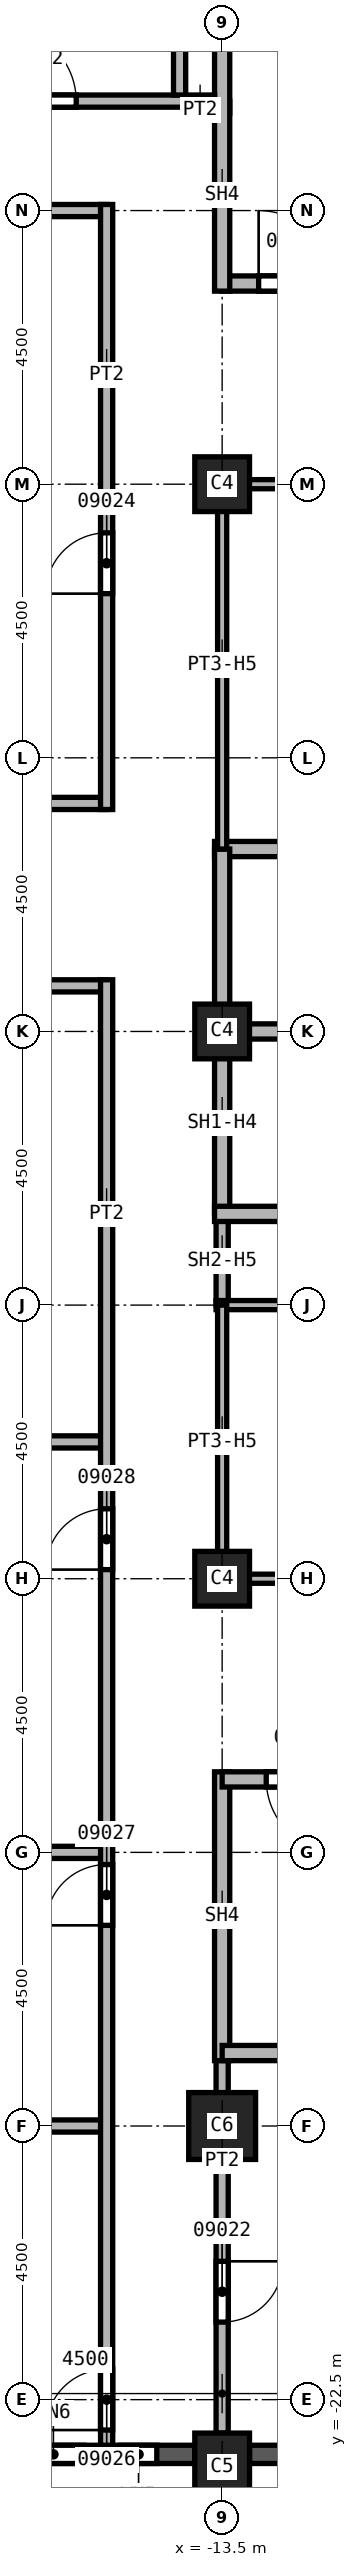
"""IFC4 building model, lengths in metres.
Left out: names, types, materials, properties, quantities, classifications, styles, units other than length and angle.
Written with IfcOpenShell. Run it as: python <this file> out.ifc"""

import sys

from ifc_helpers import new_model, si_unit, direction, frame, frame_2d, origin, origin_2d, place, context, subcontext, project, spatial, rectangle, extrude, element, fill, save


model = new_model("IFC4")
c1 = context("Model", 3, precision=1e-05, world=origin(), true_north=direction((0.0, 1.0)))
c2 = subcontext(c1, "Body", "Model", "MODEL_VIEW")
j1 = project(units=[si_unit("LENGTHUNIT", "METRE"), si_unit("PLANEANGLEUNIT", "RADIAN")], contexts=[c1])
p1 = place(None, origin())
s1 = spatial("IfcSite", under=j1, at=p1, CompositionType="ELEMENT")
p2 = place(p1, origin())
s2 = spatial("IfcBuilding", under=s1, at=p2, CompositionType="ELEMENT")
p3 = place(p2, frame((0.0, 0.0, 162.0)))
s3 = spatial("IfcBuildingStorey", under=s2, at=p3, CompositionType="ELEMENT", Elevation=162.0)
p4 = place(p3, frame((-13.5, -18.0, 0.0), z_axis=(0.0, 0.0, 1.0), x_axis=(1.0, 0.0, 0.0)))
e1 = element("IfcColumn", 1, at=p4, inside=s3, PredefinedType="COLUMN", context=c2, shape_type="SweptSolid", body=[
    extrude(rectangle(XDim=1.1, YDim=1.1, at=origin_2d()), origin(), (0.0, 0.0, 1.0), 3.7),
])
for number, where, z_axis, x_axis in (
    (2, (-13.5, 0.0, 0.0), (0.0, 0.0, 1.0), (1.0, 0.0, 0.0)),
    (3, (-13.5, 9.0, 0.0), (0.0, 0.0, 1.0), (1.0, 0.0, 0.0)),
    (4, (-13.5, -9.0, 0.0), (0.0, 0.0, 1.0), (1.0, 0.0, 0.0)),
):
    element("IfcColumn", number, at=place(p3, frame(where, z_axis=z_axis, x_axis=x_axis)), inside=s3, PredefinedType="COLUMN", context=c2, shape_type="SweptSolid", body=[
        extrude(rectangle(XDim=0.9, YDim=0.9, at=origin_2d()), origin(), (0.0, 0.0, 1.0), 3.7),
    ])
p5 = place(p3, frame((-13.5, -23.6, 0.0), z_axis=(0.0, 0.0, 1.0), x_axis=(1.0, 0.0, 0.0)))
e5 = element("IfcColumn", 5, at=p5, inside=s3, PredefinedType="COLUMN", context=c2, shape_type="SweptSolid", body=[
    extrude(rectangle(XDim=0.9, YDim=1.1, at=origin_2d()), origin(), (0.0, 0.0, 1.0), 3.7),
])
p6 = place(p3, frame((-17.55, -23.4, 0.0), z_axis=(0.0, 0.0, 1.0), x_axis=(1.0, 0.0, 0.0)))
e6 = element("IfcWall", 6, at=p6, inside=s3, PredefinedType="SOLIDWALL", context=c2, shape_type="SweptSolid", body=[
    extrude(rectangle(XDim=3.6, YDim=0.3, at=frame_2d((1.8, 0.0))), origin(), (0.0, 0.0, 1.0), 3.1),
])
p7 = place(p6, frame((0.775, 0.0, 0.8)))
e7 = element("IfcOpeningElement", 7, at=p7, cuts=e6, PredefinedType="OPENING", context=c2, shape_type="SweptSolid", body=[
    extrude(rectangle(XDim=1.0, YDim=1.95, at=frame_2d((0.5, 0.975))), frame((0.0, 0.15, 0.0), z_axis=(0.0, -1.0, 0.0), x_axis=(1.0, 0.0, 0.0)), (0.0, 0.0, 1.0), 0.3),
])
p8 = place(p6, frame((2.375, 0.0, 0.8)))
e8 = element("IfcOpeningElement", 8, at=p8, cuts=e6, PredefinedType="OPENING", context=c2, shape_type="SweptSolid", body=[
    extrude(rectangle(XDim=0.6, YDim=1.95, at=frame_2d((0.3, 0.975))), frame((0.0, 0.15, 0.0), z_axis=(0.0, -1.0, 0.0), x_axis=(1.0, 0.0, 0.0)), (0.0, 0.0, 1.0), 0.3),
])
p9 = place(p3, frame((-13.05, -23.4, 0.0), z_axis=(0.0, 0.0, 1.0), x_axis=(1.0, 0.0, 0.0)))
e9 = element("IfcWall", 9, at=p9, inside=s3, PredefinedType="SOLIDWALL", context=c2, shape_type="SweptSolid", body=[
    extrude(rectangle(XDim=3.6, YDim=0.3, at=frame_2d((1.8, 0.0))), origin(), (0.0, 0.0, 1.0), 3.1),
])
p10 = place(p9, frame((0.6, 0.0, 0.8)))
e10 = element("IfcOpeningElement", 10, at=p10, cuts=e9, PredefinedType="OPENING", context=c2, shape_type="SweptSolid", body=[
    extrude(rectangle(XDim=2.4, YDim=1.95, at=frame_2d((1.2, 0.975))), frame((0.0, 0.15, 0.0), z_axis=(0.0, -1.0, 0.0), x_axis=(1.0, 0.0, 0.0)), (0.0, 0.0, 1.0), 0.3),
])
p11 = place(p3, frame((-33.85, 3.75, 0.0), z_axis=(0.0, 0.0, 1.0), x_axis=(1.0, 0.0, 0.0)))
e11 = element("IfcWall", 11, at=p11, inside=s3, PredefinedType="PARTITIONING", context=c2, shape_type="SweptSolid", body=[
    extrude(rectangle(XDim=18.45, YDim=0.2, at=frame_2d((9.225, 0.0))), origin(), (0.0, 0.0, 1.0), 3.7),
])
p12 = place(p11, frame((2.5, 0.0, 0.0)))
e12 = element("IfcOpeningElement", 12, at=p12, cuts=e11, PredefinedType="OPENING", context=c2, shape_type="SweptSolid", body=[
    extrude(rectangle(XDim=1.0, YDim=2.1, at=frame_2d((0.5, 1.05))), frame((0.0, 0.1, 0.0), z_axis=(0.0, -1.0, 0.0), x_axis=(1.0, 0.0, 0.0)), (0.0, 0.0, 1.0), 0.2),
])
for number, where, z_axis, x_axis in (
    (13, (-27.1, -13.5, 0.0), (0.0, 0.0, 1.0), (1.0, 0.0, 0.0)),
    (14, (-27.1, -6.75, 0.0), (0.0, 0.0, 1.0), (1.0, 0.0, 0.0)),
):
    element("IfcWall", number, at=place(p3, frame(where, z_axis=z_axis, x_axis=x_axis)), inside=s3, PredefinedType="PARTITIONING", context=c2, shape_type="SweptSolid", body=[
        extrude(rectangle(XDim=11.7, YDim=0.2, at=frame_2d((5.85, 0.0))), origin(), (0.0, 0.0, 1.0), 3.7),
    ])
p13 = place(p3, frame((-15.4, 0.75, 0.0), z_axis=(0.0, 0.0, 1.0), x_axis=(-1.0, 0.0, 0.0)))
e15 = element("IfcWall", 15, at=p13, inside=s3, PredefinedType="PARTITIONING", context=c2, shape_type="SweptSolid", body=[
    extrude(rectangle(XDim=18.45, YDim=0.2, at=frame_2d((9.225, 0.0))), origin(), (0.0, 0.0, 1.0), 3.7),
])
p14 = place(p13, frame((5.35, 0.0, 0.0)))
e16 = element("IfcOpeningElement", 16, at=p14, cuts=e15, PredefinedType="OPENING", context=c2, shape_type="SweptSolid", body=[
    extrude(rectangle(XDim=1.0, YDim=2.1, at=frame_2d((0.5, 1.05))), frame((0.0, 0.1, 0.0), z_axis=(0.0, -1.0, 0.0), x_axis=(1.0, 0.0, 0.0)), (0.0, 0.0, 1.0), 0.2),
])
p15 = place(p3, frame((-24.2, -18.0, 0.0), z_axis=(0.0, 0.0, 1.0), x_axis=(1.0, 0.0, 0.0)))
e17 = element("IfcWall", 17, at=p15, inside=s3, PredefinedType="PARTITIONING", context=c2, shape_type="SweptSolid", body=[
    extrude(rectangle(XDim=8.8, YDim=0.2, at=frame_2d((4.4, 0.0))), origin(), (0.0, 0.0, 1.0), 3.7),
])
p16 = place(p3, frame((-15.4, 13.5, 0.0), z_axis=(0.0, 0.0, 1.0), x_axis=(-1.0, 0.0, 0.0)))
e18 = element("IfcWall", 18, at=p16, inside=s3, PredefinedType="PARTITIONING", context=c2, shape_type="SweptSolid", body=[
    extrude(rectangle(XDim=6.6, YDim=0.2, at=frame_2d((3.3, 0.0))), origin(), (0.0, 0.0, 1.0), 3.7),
])
p17 = place(p3, frame((-15.4, -23.25, 0.0), z_axis=(0.0, 0.0, 1.0), x_axis=(0.0, 1.0, 0.0)))
e19 = element("IfcWall", 19, at=p17, inside=s3, PredefinedType="PARTITIONING", context=c2, shape_type="SweptSolid", body=[
    extrude(rectangle(XDim=24.1, YDim=0.2, at=frame_2d((12.05, 0.0))), origin(), (0.0, 0.0, 1.0), 3.7),
])
p18 = place(p17, frame((0.25, 0.0, 0.0)))
e20 = element("IfcOpeningElement", 20, at=p18, cuts=e19, PredefinedType="OPENING", context=c2, shape_type="SweptSolid", body=[
    extrude(rectangle(XDim=1.0, YDim=2.1, at=frame_2d((0.5, 1.05))), frame((0.0, 0.1, 0.0), z_axis=(0.0, -1.0, 0.0), x_axis=(1.0, 0.0, 0.0)), (0.0, 0.0, 1.0), 0.2),
])
p19 = place(p17, frame((8.55, 0.0, 0.0)))
e21 = element("IfcOpeningElement", 21, at=p19, cuts=e19, PredefinedType="OPENING", context=c2, shape_type="SweptSolid", body=[
    extrude(rectangle(XDim=1.0, YDim=2.1, at=frame_2d((0.5, 1.05))), frame((0.0, 0.1, 0.0), z_axis=(0.0, -1.0, 0.0), x_axis=(1.0, 0.0, 0.0)), (0.0, 0.0, 1.0), 0.2),
])
p20 = place(p17, frame((14.4, 0.0, 0.0)))
e22 = element("IfcOpeningElement", 22, at=p20, cuts=e19, PredefinedType="OPENING", context=c2, shape_type="SweptSolid", body=[
    extrude(rectangle(XDim=1.0, YDim=2.1, at=frame_2d((0.5, 1.05))), frame((0.0, 0.1, 0.0), z_axis=(0.0, -1.0, 0.0), x_axis=(1.0, 0.0, 0.0)), (0.0, 0.0, 1.0), 0.2),
])
p21 = place(p3, frame((-15.4, 3.65, 0.0), z_axis=(0.0, 0.0, 1.0), x_axis=(0.0, 1.0, 0.0)))
e23 = element("IfcWall", 23, at=p21, inside=s3, PredefinedType="PARTITIONING", context=c2, shape_type="SweptSolid", body=[
    extrude(rectangle(XDim=9.95, YDim=0.2, at=frame_2d((4.975, 0.0))), origin(), (0.0, 0.0, 1.0), 3.7),
])
p22 = place(p21, frame((3.55, 0.0, 0.0)))
e24 = element("IfcOpeningElement", 24, at=p22, cuts=e23, PredefinedType="OPENING", context=c2, shape_type="SweptSolid", body=[
    extrude(rectangle(XDim=1.0, YDim=2.1, at=frame_2d((0.5, 1.05))), frame((0.0, 0.1, 0.0), z_axis=(0.0, -1.0, 0.0), x_axis=(1.0, 0.0, 0.0)), (0.0, 0.0, 1.0), 0.2),
])
p23 = place(p3, frame((-14.1, 15.2, 0.0), z_axis=(0.0, 0.0, 1.0), x_axis=(1.0, 0.0, 0.0)))
e25 = element("IfcWall", 25, at=p23, inside=s3, PredefinedType="PARTITIONING", context=c2, shape_type="SweptSolid", body=[
    extrude(rectangle(XDim=0.725, YDim=0.2, at=frame_2d((0.363, 0.0))), origin(), (0.0, 0.0, 1.0), 3.7),
])
p24 = place(p3, frame((-13.5, -16.675, 0.0), z_axis=(0.0, 0.0, 1.0), x_axis=(0.0, -1.0, 0.0)))
e26 = element("IfcWall", 26, at=p24, inside=s3, PredefinedType="PARTITIONING", context=c2, shape_type="SweptSolid", body=[
    extrude(rectangle(XDim=6.375, YDim=0.2, at=frame_2d((3.188, 0.0))), origin(), (0.0, 0.0, 1.0), 3.7),
])
p25 = place(p24, frame((3.55, 0.0, 0.0)))
e27 = element("IfcOpeningElement", 27, at=p25, cuts=e26, PredefinedType="OPENING", context=c2, shape_type="SweptSolid", body=[
    extrude(rectangle(XDim=1.0, YDim=2.1, at=frame_2d((0.5, 1.05))), frame((0.0, 0.1, 0.0), z_axis=(0.0, -1.0, 0.0), x_axis=(1.0, 0.0, 0.0)), (0.0, 0.0, 1.0), 0.2),
])
p26 = place(p3, frame((-13.5, -4.5, 0.0), z_axis=(0.0, 0.0, 1.0), x_axis=(0.0, 1.0, 0.0)))
e28 = element("IfcWall", 28, at=p26, inside=s3, PredefinedType="SOLIDWALL", context=c2, shape_type="SweptSolid", body=[
    extrude(rectangle(XDim=1.5, YDim=0.2, at=frame_2d((0.75, 0.0))), origin(), (0.0, 0.0, 1.0), 2.938),
])
p27 = place(p3, frame((-13.625, 0.0, 0.0), z_axis=(0.0, 0.0, 1.0), x_axis=(1.0, 0.0, 0.0)))
e29 = element("IfcWall", 29, at=p27, inside=s3, PredefinedType="SOLIDWALL", context=c2, shape_type="SweptSolid", body=[
    extrude(rectangle(XDim=3.125, YDim=0.25, at=frame_2d((1.562, 0.0))), origin(), (0.0, 0.0, 1.0), 3.7),
])
p28 = place(p3, frame((-13.625, 3.0, 0.0), z_axis=(0.0, 0.0, 1.0), x_axis=(1.0, 0.0, 0.0)))
e30 = element("IfcWall", 30, at=p28, inside=s3, PredefinedType="SOLIDWALL", context=c2, shape_type="SweptSolid", body=[
    extrude(rectangle(XDim=6.125, YDim=0.25, at=frame_2d((3.062, 0.0))), origin(), (0.0, 0.0, 1.0), 3.7),
])
p29 = place(p28, frame((3.25, 0.0, 0.0)))
e31 = element("IfcOpeningElement", 31, at=p29, cuts=e30, PredefinedType="OPENING", context=c2, shape_type="SweptSolid", body=[
    extrude(rectangle(XDim=1.1, YDim=2.1, at=frame_2d((0.55, 1.05))), frame((0.0, 0.125, 0.0), z_axis=(0.0, -1.0, 0.0), x_axis=(1.0, 0.0, 0.0)), (0.0, 0.0, 1.0), 0.25),
])
p30 = place(p3, frame((-13.5, -3.0, 0.0), z_axis=(0.0, 0.0, 1.0), x_axis=(0.0, 1.0, 0.0)))
e32 = element("IfcWall", 32, at=p30, inside=s3, PredefinedType="SOLIDWALL", context=c2, shape_type="SweptSolid", body=[
    extrude(rectangle(XDim=6.0, YDim=0.25, at=frame_2d((3.0, 0.0))), origin(), (0.0, 0.0, 1.0), 2.938),
])
p31 = place(p3, frame((-13.625, -3.0, 0.0), z_axis=(0.0, 0.0, 1.0), x_axis=(1.0, 0.0, 0.0)))
e33 = element("IfcWall", 33, at=p31, inside=s3, PredefinedType="SOLIDWALL", context=c2, shape_type="SweptSolid", body=[
    extrude(rectangle(XDim=9.25, YDim=0.25, at=frame_2d((4.625, 0.0))), origin(), (0.0, 0.0, 1.0), 3.7),
])
p32 = place(p31, frame((3.25, 0.0, 0.0)))
e34 = element("IfcOpeningElement", 34, at=p32, cuts=e33, PredefinedType="OPENING", context=c2, shape_type="SweptSolid", body=[
    extrude(rectangle(XDim=1.1, YDim=2.1, at=frame_2d((0.55, 1.05))), frame((0.0, 0.125, 0.0), z_axis=(0.0, -1.0, 0.0), x_axis=(1.0, 0.0, 0.0)), (0.0, 0.0, 1.0), 0.25),
])
p33 = place(p3, frame((-13.5, -12.175, 0.0), z_axis=(0.0, 0.0, 1.0), x_axis=(0.0, -1.0, 0.0)))
e35 = element("IfcWall", 35, at=p33, inside=s3, PredefinedType="SOLIDWALL", context=c2, shape_type="SweptSolid", body=[
    extrude(rectangle(XDim=4.75, YDim=0.25, at=frame_2d((2.375, 0.0))), origin(), (0.0, 0.0, 1.0), 3.7),
])
p34 = place(p3, frame((-13.5, 12.3, 0.0), z_axis=(0.0, 0.0, 1.0), x_axis=(1.0, 0.0, 0.0)))
e36 = element("IfcWall", 36, at=p34, inside=s3, PredefinedType="SOLIDWALL", context=c2, shape_type="SweptSolid", body=[
    extrude(rectangle(XDim=9.125, YDim=0.25, at=frame_2d((4.562, 0.0))), origin(), (0.0, 0.0, 1.0), 3.7),
])
p35 = place(p34, frame((0.6, 0.0, 0.0)))
e37 = element("IfcOpeningElement", 37, at=p35, cuts=e36, PredefinedType="OPENING", context=c2, shape_type="SweptSolid", body=[
    extrude(rectangle(XDim=1.2, YDim=2.1, at=frame_2d((0.6, 1.05))), frame((0.0, 0.125, 0.0), z_axis=(0.0, -1.0, 0.0), x_axis=(1.0, 0.0, 0.0)), (0.0, 0.0, 1.0), 0.25),
])
p36 = place(p3, frame((-13.5, 12.175, 0.0), z_axis=(0.0, 0.0, 1.0), x_axis=(0.0, 1.0, 0.0)))
e38 = element("IfcWall", 38, at=p36, inside=s3, PredefinedType="SOLIDWALL", context=c2, shape_type="SweptSolid", body=[
    extrude(rectangle(XDim=4.75, YDim=0.25, at=frame_2d((2.375, 0.0))), origin(), (0.0, 0.0, 1.0), 3.7),
])
p37 = place(p3, frame((-4.5, -16.8, 0.0), z_axis=(0.0, 0.0, 1.0), x_axis=(-1.0, 0.0, 0.0)))
e39 = element("IfcWall", 39, at=p37, inside=s3, PredefinedType="SOLIDWALL", context=c2, shape_type="SweptSolid", body=[
    extrude(rectangle(XDim=9.0, YDim=0.25, at=frame_2d((4.5, 0.0))), origin(), (0.0, 0.0, 1.0), 3.7),
])
p38 = place(p3, frame((-4.375, -12.3, 0.0), z_axis=(0.0, 0.0, 1.0), x_axis=(-1.0, 0.0, 0.0)))
e40 = element("IfcWall", 40, at=p38, inside=s3, PredefinedType="SOLIDWALL", context=c2, shape_type="SweptSolid", body=[
    extrude(rectangle(XDim=9.125, YDim=0.25, at=frame_2d((4.562, 0.0))), origin(), (0.0, 0.0, 1.0), 3.7),
])
p39 = place(p38, frame((7.2, 0.0, 0.0)))
e41 = element("IfcOpeningElement", 41, at=p39, cuts=e40, PredefinedType="OPENING", context=c2, shape_type="SweptSolid", body=[
    extrude(rectangle(XDim=1.2, YDim=2.1, at=frame_2d((0.6, 1.05))), frame((0.0, 0.125, 0.0), z_axis=(0.0, -1.0, 0.0), x_axis=(1.0, 0.0, 0.0)), (0.0, 0.0, 1.0), 0.25),
])
p40 = place(p3, frame((-13.6, -4.5, 0.0), z_axis=(0.0, 0.0, 1.0), x_axis=(1.0, 0.0, 0.0)))
e42 = element("IfcWall", 42, at=p40, inside=s3, PredefinedType="PARTITIONING", context=c2, shape_type="SweptSolid", body=[
    extrude(rectangle(XDim=3.1, YDim=0.15, at=frame_2d((1.55, 0.0))), origin(), (0.0, 0.0, 1.0), 3.7),
])
p41 = place(p3, frame((-13.5, -9.075, 0.0), z_axis=(0.0, 0.0, 1.0), x_axis=(0.0, 1.0, 0.0)))
e43 = element("IfcWall", 43, at=p41, inside=s3, PredefinedType="PARTITIONING", context=c2, shape_type="SweptSolid", body=[
    extrude(rectangle(XDim=4.575, YDim=0.15, at=frame_2d((2.288, 0.0))), origin(), (0.0, 0.0, 1.0), 2.938),
])
p42 = place(p3, frame((-13.5, 3.0, 0.0), z_axis=(0.0, 0.0, 1.0), x_axis=(0.0, 1.0, 0.0)))
e44 = element("IfcWall", 44, at=p42, inside=s3, PredefinedType="PARTITIONING", context=c2, shape_type="SweptSolid", body=[
    extrude(rectangle(XDim=6.075, YDim=0.15, at=frame_2d((3.038, 0.0))), origin(), (0.0, 0.0, 1.0), 2.938),
])
for number, where, z_axis, x_axis in (
    (45, (-13.5, 9.0, 0.0), (0.0, 0.0, 1.0), (1.0, 0.0, 0.0)),
    (46, (-10.5, -9.0, 0.0), (0.0, 0.0, 1.0), (-1.0, 0.0, 0.0)),
):
    element("IfcWall", number, at=place(p3, frame(where, z_axis=z_axis, x_axis=x_axis)), inside=s3, PredefinedType="PARTITIONING", context=c2, shape_type="SweptSolid", body=[
        extrude(rectangle(XDim=3.0, YDim=0.15, at=frame_2d((1.5, 0.0))), origin(), (0.0, 0.0, 1.0), 2.938),
    ])
p43 = place(p3, frame((-21.9, 15.3, 0.0), z_axis=(0.0, 0.0, 1.0), x_axis=(1.0, 0.0, 0.0)))
e47 = element("IfcWall", 47, at=p43, inside=s3, PredefinedType="SOLIDWALL", context=c2, shape_type="SweptSolid", body=[
    extrude(rectangle(XDim=8.275, YDim=0.2, at=frame_2d((4.137, 0.0))), origin(), (0.0, 0.0, 1.0), 3.7),
])
p44 = place(p43, frame((4.8, 0.0, 0.0)))
e48 = element("IfcOpeningElement", 48, at=p44, cuts=e47, PredefinedType="OPENING", context=c2, shape_type="SweptSolid", body=[
    extrude(rectangle(XDim=1.2, YDim=2.1, at=frame_2d((0.6, 1.05))), frame((0.0, 0.1, 0.0), z_axis=(0.0, -1.0, 0.0), x_axis=(1.0, 0.0, 0.0)), (0.0, 0.0, 1.0), 0.2),
])
p45 = place(p3, frame((-14.2, 15.4, 0.0), z_axis=(0.0, 0.0, 1.0), x_axis=(0.0, 1.0, 0.0)))
e49 = element("IfcWall", 49, at=p45, inside=s3, PredefinedType="SOLIDWALL", context=c2, shape_type="SweptSolid", body=[
    extrude(rectangle(XDim=5.9, YDim=0.2, at=frame_2d((2.95, 0.0))), origin(), (0.0, 0.0, 1.0), 3.7),
])
p46 = place(p35, origin())
e50 = element("IfcDoor", 50, at=p46, inside=s3, OperationType="SINGLE_SWING_LEFT", PredefinedType="DOOR", context=c2, shape_type="SweptSolid", body=[
    extrude(rectangle(XDim=1.2, YDim=2.1, at=frame_2d((0.6, 1.05))), frame((0.0, 0.025, 0.0), z_axis=(0.0, -1.0, 0.0), x_axis=(1.0, 0.0, 0.0)), (0.0, 0.0, 1.0), 0.05),
])
fill(e37, e50)
p47 = place(p39, origin())
e51 = element("IfcDoor", 51, at=p47, inside=s3, OperationType="SINGLE_SWING_RIGHT", PredefinedType="DOOR", context=c2, shape_type="SweptSolid", body=[
    extrude(rectangle(XDim=1.2, YDim=2.1, at=frame_2d((0.6, 1.05))), frame((0.0, 0.025, 0.0), z_axis=(0.0, -1.0, 0.0), x_axis=(1.0, 0.0, 0.0)), (0.0, 0.0, 1.0), 0.05),
])
fill(e41, e51)
p48 = place(p25, origin())
e52 = element("IfcDoor", 52, at=p48, inside=s3, OperationType="SINGLE_SWING_LEFT", PredefinedType="DOOR", context=c2, shape_type="SweptSolid", body=[
    extrude(rectangle(XDim=1.0, YDim=2.1, at=frame_2d((0.5, 1.05))), frame((0.0, 0.025, 0.0), z_axis=(0.0, -1.0, 0.0), x_axis=(1.0, 0.0, 0.0)), (0.0, 0.0, 1.0), 0.05),
])
fill(e27, e52)
p49 = place(p22, origin())
e53 = element("IfcDoor", 53, at=p49, inside=s3, OperationType="SINGLE_SWING_LEFT", PredefinedType="DOOR", context=c2, shape_type="SweptSolid", body=[
    extrude(rectangle(XDim=1.0, YDim=2.1, at=frame_2d((0.5, 1.05))), frame((0.0, 0.025, 0.0), z_axis=(0.0, -1.0, 0.0), x_axis=(1.0, 0.0, 0.0)), (0.0, 0.0, 1.0), 0.05),
])
fill(e24, e53)
p50 = place(p18, origin())
e54 = element("IfcDoor", 54, at=p50, inside=s3, OperationType="SINGLE_SWING_LEFT", PredefinedType="DOOR", context=c2, shape_type="SweptSolid", body=[
    extrude(rectangle(XDim=1.0, YDim=2.1, at=frame_2d((0.5, 1.05))), frame((0.0, 0.025, 0.0), z_axis=(0.0, -1.0, 0.0), x_axis=(1.0, 0.0, 0.0)), (0.0, 0.0, 1.0), 0.05),
])
fill(e20, e54)
p51 = place(p19, origin())
e55 = element("IfcDoor", 55, at=p51, inside=s3, OperationType="SINGLE_SWING_RIGHT", PredefinedType="DOOR", context=c2, shape_type="SweptSolid", body=[
    extrude(rectangle(XDim=1.0, YDim=2.1, at=frame_2d((0.5, 1.05))), frame((0.0, 0.025, 0.0), z_axis=(0.0, -1.0, 0.0), x_axis=(1.0, 0.0, 0.0)), (0.0, 0.0, 1.0), 0.05),
])
fill(e21, e55)
p52 = place(p20, origin())
e56 = element("IfcDoor", 56, at=p52, inside=s3, OperationType="SINGLE_SWING_LEFT", PredefinedType="DOOR", context=c2, shape_type="SweptSolid", body=[
    extrude(rectangle(XDim=1.0, YDim=2.1, at=frame_2d((0.5, 1.05))), frame((0.0, 0.025, 0.0), z_axis=(0.0, -1.0, 0.0), x_axis=(1.0, 0.0, 0.0)), (0.0, 0.0, 1.0), 0.05),
])
fill(e22, e56)
p53 = place(p44, origin())
e57 = element("IfcDoor", 57, at=p53, inside=s3, OperationType="SINGLE_SWING_RIGHT", PredefinedType="DOOR", context=c2, shape_type="SweptSolid", body=[
    extrude(rectangle(XDim=1.2, YDim=2.1, at=frame_2d((0.6, 1.05))), frame((0.0, 0.025, 0.0), z_axis=(0.0, -1.0, 0.0), x_axis=(1.0, 0.0, 0.0)), (0.0, 0.0, 1.0), 0.05),
])
fill(e48, e57)
p54 = place(p7, origin())
e58 = element("IfcWindow", 58, at=p54, inside=s3, PartitioningType="SINGLE_PANEL", PredefinedType="WINDOW", context=c2, shape_type="SweptSolid", body=[
    extrude(rectangle(XDim=1.0, YDim=1.95, at=frame_2d((0.5, 0.975))), frame((0.0, 0.03, 0.0), z_axis=(0.0, -1.0, 0.0), x_axis=(1.0, 0.0, 0.0)), (0.0, 0.0, 1.0), 0.06),
])
fill(e7, e58)
p55 = place(p8, origin())
e59 = element("IfcWindow", 59, at=p55, inside=s3, PartitioningType="SINGLE_PANEL", PredefinedType="WINDOW", context=c2, shape_type="SweptSolid", body=[
    extrude(rectangle(XDim=0.6, YDim=1.95, at=frame_2d((0.3, 0.975))), frame((0.0, 0.03, 0.0), z_axis=(0.0, -1.0, 0.0), x_axis=(1.0, 0.0, 0.0)), (0.0, 0.0, 1.0), 0.06),
])
fill(e8, e59)
save(model, sys.argv[1])
